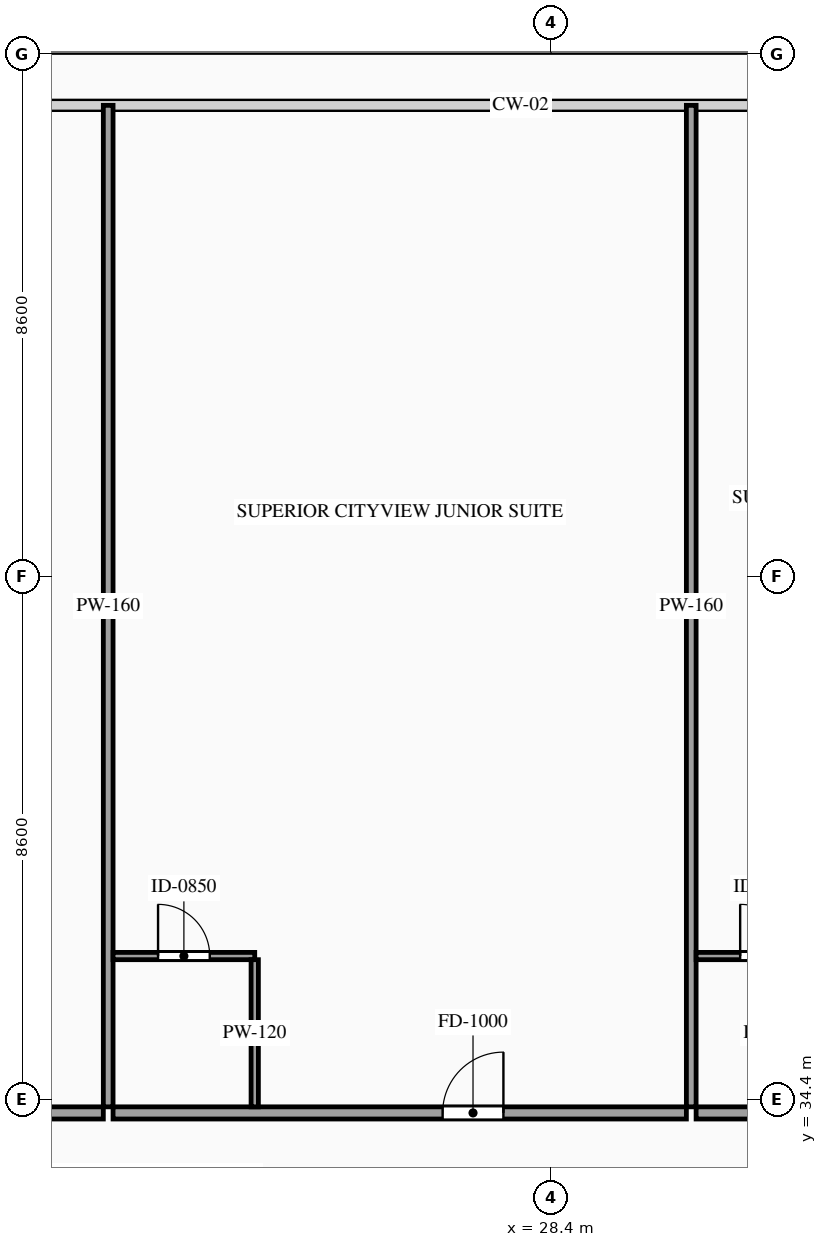
"""IFC4 building model, lengths in metres.
Left out: names, types, materials, properties, quantities, classifications, styles, units other than length and angle.
Written with IfcOpenShell. Run it as: python <this file> out.ifc"""

import sys

from ifc_helpers import new_model, si_unit, direction, frame, frame_2d, origin, place, context, subcontext, project, spatial, rectangle, extrude, source, transform, mapped, element, fill, save


model = new_model("IFC4")
c1 = context("Model", 3, precision=1e-05, world=origin(), true_north=direction((0.0, 1.0)))
c2 = subcontext(c1, "Body", "Model", "MODEL_VIEW")
j1 = project(units=[si_unit("LENGTHUNIT", "METRE"), si_unit("PLANEANGLEUNIT", "RADIAN")], contexts=[c1])
p1 = place(None, origin())
s1 = spatial("IfcSite", under=j1, at=p1, CompositionType="ELEMENT")
p2 = place(p1, origin())
s2 = spatial("IfcBuilding", under=s1, at=p2, CompositionType="ELEMENT")
p3 = place(p2, frame((0.0, 0.0, 67.6)))
s3 = spatial("IfcBuildingStorey", under=s2, at=p3, CompositionType="ELEMENT", Elevation=67.6)
p4 = place(p3, frame((14.94, 34.18, 0.0), z_axis=(0.0, 0.0, 1.0), x_axis=(1.0, 0.0, 0.0)))
e1 = element("IfcWall", 1, at=p4, inside=s3, PredefinedType="PARTITIONING", context=c2, shape_type="SweptSolid", body=[
    extrude(rectangle(XDim=6.097, YDim=0.2, at=frame_2d((3.049, 0.0))), origin(), (0.0, 0.0, 1.0), 3.38),
])
p5 = place(p4, frame((3.754, 0.0, 0.0)))
e2 = element("IfcOpeningElement", 2, at=p5, cuts=e1, PredefinedType="OPENING", context=c2, shape_type="SweptSolid", body=[
    extrude(rectangle(XDim=1.0, YDim=2.2, at=frame_2d((0.5, 1.1))), frame((0.0, 0.115, 0.0), z_axis=(0.0, -1.0, 0.0), x_axis=(1.0, 0.0, 0.0)), (0.0, 0.0, 1.0), 0.23),
])
m1 = source(origin(), c2, "Body", "SweptSolid", [
    extrude(rectangle(XDim=16.47, YDim=0.16, at=frame_2d((8.235, 0.0))), origin(), (0.0, 0.0, 1.0), 3.38),
])
p6 = place(p3, frame((21.117, 34.28, 0.0), z_axis=(0.0, 0.0, 1.0), x_axis=(0.0, 1.0, 0.0)))
e3 = element("IfcWall", 3, at=p6, inside=s3, PredefinedType="PARTITIONING", context=c2, shape_type="MappedRepresentation", body=[
    mapped(m1, transform((0.0, 0.0, 0.0), scale=1.0)),
])
p7 = place(p3, frame((21.197, 34.18, 0.0), z_axis=(0.0, 0.0, 1.0), x_axis=(1.0, 0.0, 0.0)))
e4 = element("IfcWall", 4, at=p7, inside=s3, PredefinedType="PARTITIONING", context=c2, shape_type="SweptSolid", body=[
    extrude(rectangle(XDim=9.429, YDim=0.2, at=frame_2d((4.714, 0.0))), origin(), (0.0, 0.0, 1.0), 3.38),
])
p8 = place(p7, frame((5.42, 0.0, 0.0)))
e5 = element("IfcOpeningElement", 5, at=p8, cuts=e4, PredefinedType="OPENING", context=c2, shape_type="SweptSolid", body=[
    extrude(rectangle(XDim=1.0, YDim=2.2, at=frame_2d((0.5, 1.1))), frame((0.0, 0.115, 0.0), z_axis=(0.0, -1.0, 0.0), x_axis=(1.0, 0.0, 0.0)), (0.0, 0.0, 1.0), 0.23),
])
p9 = place(p3, frame((30.706, 34.28, 0.0), z_axis=(0.0, 0.0, 1.0), x_axis=(0.0, 1.0, 0.0)))
e6 = element("IfcWall", 6, at=p9, inside=s3, PredefinedType="PARTITIONING", context=c2, shape_type="MappedRepresentation", body=[
    mapped(m1, transform((0.0, 0.0, 0.0), scale=1.0)),
])
p10 = place(p3, frame((21.197, 36.76, 0.0), z_axis=(0.0, 0.0, 1.0), x_axis=(1.0, 0.0, 0.0)))
e7 = element("IfcWall", 7, at=p10, inside=s3, PredefinedType="PARTITIONING", context=c2, shape_type="SweptSolid", body=[
    extrude(rectangle(XDim=2.33, YDim=0.12, at=frame_2d((1.165, 0.0))), origin(), (0.0, 0.0, 1.0), 3.38),
])
p11 = place(p10, frame((0.74, 0.0, 0.0)))
e8 = element("IfcOpeningElement", 8, at=p11, cuts=e7, PredefinedType="OPENING", context=c2, shape_type="SweptSolid", body=[
    extrude(rectangle(XDim=0.85, YDim=2.1, at=frame_2d((0.425, 1.05))), frame((0.0, 0.075, 0.0), z_axis=(0.0, -1.0, 0.0), x_axis=(1.0, 0.0, 0.0)), (0.0, 0.0, 1.0), 0.15),
])
m2 = source(origin(), c2, "Body", "SweptSolid", [
    extrude(rectangle(XDim=2.42, YDim=0.12, at=frame_2d((1.21, 0.0))), origin(), (0.0, 0.0, 1.0), 3.38),
])
p12 = place(p3, frame((23.527, 34.28, 0.0), z_axis=(0.0, 0.0, 1.0), x_axis=(0.0, 1.0, 0.0)))
e9 = element("IfcWall", 9, at=p12, inside=s3, PredefinedType="PARTITIONING", context=c2, shape_type="MappedRepresentation", body=[
    mapped(m2, transform((0.0, 0.0, 0.0), scale=1.0)),
])
p13 = place(p3, frame((30.786, 34.18, 0.0), z_axis=(0.0, 0.0, 1.0), x_axis=(1.0, 0.0, 0.0)))
e10 = element("IfcWall", 10, at=p13, inside=s3, PredefinedType="PARTITIONING", context=c2, shape_type="SweptSolid", body=[
    extrude(rectangle(XDim=4.369, YDim=0.2, at=frame_2d((2.185, 0.0))), origin(), (0.0, 0.0, 1.0), 3.38),
])
p14 = place(p13, frame((2.874, 0.0, 0.0)))
e11 = element("IfcOpeningElement", 11, at=p14, cuts=e10, PredefinedType="OPENING", context=c2, shape_type="SweptSolid", body=[
    extrude(rectangle(XDim=1.0, YDim=2.2, at=frame_2d((0.5, 1.1))), frame((0.0, 0.115, 0.0), z_axis=(0.0, -1.0, 0.0), x_axis=(1.0, 0.0, 0.0)), (0.0, 0.0, 1.0), 0.23),
])
p15 = place(p3, frame((30.786, 36.76, 0.0), z_axis=(0.0, 0.0, 1.0), x_axis=(1.0, 0.0, 0.0)))
e12 = element("IfcWall", 12, at=p15, inside=s3, PredefinedType="PARTITIONING", context=c2, shape_type="SweptSolid", body=[
    extrude(rectangle(XDim=2.299, YDim=0.12, at=frame_2d((1.149, 0.0))), origin(), (0.0, 0.0, 1.0), 3.38),
])
p16 = place(p15, frame((0.725, 0.0, 0.0)))
e13 = element("IfcOpeningElement", 13, at=p16, cuts=e12, PredefinedType="OPENING", context=c2, shape_type="SweptSolid", body=[
    extrude(rectangle(XDim=0.85, YDim=2.1, at=frame_2d((0.425, 1.05))), frame((0.0, 0.075, 0.0), z_axis=(0.0, -1.0, 0.0), x_axis=(1.0, 0.0, 0.0)), (0.0, 0.0, 1.0), 0.15),
])
m3 = source(origin(), c2, "Body", "SweptSolid", [
    extrude(rectangle(XDim=1.0, YDim=2.2, at=frame_2d((0.5, 1.1))), frame((0.0, 0.025, 0.0), z_axis=(0.0, -1.0, 0.0), x_axis=(1.0, 0.0, 0.0)), (0.0, 0.0, 1.0), 0.05),
])
p17 = place(p8, origin())
e14 = element("IfcDoor", 14, at=p17, inside=s3, OperationType="SINGLE_SWING_RIGHT", PredefinedType="DOOR", context=c2, shape_type="MappedRepresentation", body=[
    mapped(m3, transform((0.0, 0.0, 0.0), scale=1.0)),
])
fill(e5, e14)
m4 = source(origin(), c2, "Body", "SweptSolid", [
    extrude(rectangle(XDim=0.85, YDim=2.1, at=frame_2d((0.425, 1.05))), frame((0.0, 0.025, 0.0), z_axis=(0.0, -1.0, 0.0), x_axis=(1.0, 0.0, 0.0)), (0.0, 0.0, 1.0), 0.05),
])
p18 = place(p11, origin())
e15 = element("IfcDoor", 15, at=p18, inside=s3, OperationType="SINGLE_SWING_LEFT", PredefinedType="DOOR", context=c2, shape_type="MappedRepresentation", body=[
    mapped(m4, transform((0.0, 0.0, 0.0), scale=1.0)),
])
fill(e8, e15)
p19 = place(p16, origin())
e16 = element("IfcDoor", 16, at=p19, inside=s3, OperationType="SINGLE_SWING_LEFT", PredefinedType="DOOR", context=c2, shape_type="MappedRepresentation", body=[
    mapped(m4, transform((0.0, 0.0, 0.0), scale=1.0)),
])
fill(e13, e16)
save(model, sys.argv[1])
